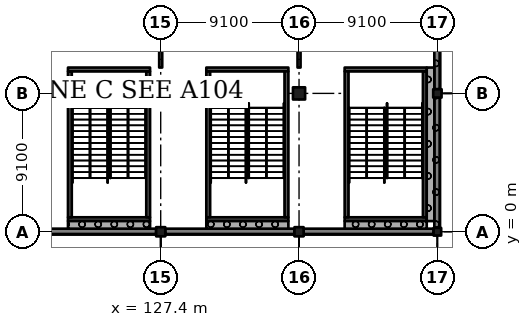
"""IFC4 building model, lengths in metres.
Left out: names, types, materials, properties, quantities, classifications, styles, units other than length and angle.
Written with IfcOpenShell. Run it as: python <this file> out.ifc"""

import sys

from ifc_helpers import new_model, si_unit, direction, frame, frame_2d, origin, origin_2d, place, context, subcontext, project, spatial, rectangle, extrude, element, fill, save


model = new_model("IFC4")
c1 = context("Model", 3, precision=1e-05, world=origin(), true_north=direction((0.0, 1.0)))
c2 = subcontext(c1, "Body", "Model", "MODEL_VIEW")
j1 = project(units=[si_unit("LENGTHUNIT", "METRE"), si_unit("PLANEANGLEUNIT", "RADIAN")], contexts=[c1])
p1 = place(None, origin())
s1 = spatial("IfcSite", under=j1, at=p1, CompositionType="ELEMENT")
p2 = place(p1, origin())
s2 = spatial("IfcBuilding", under=s1, at=p2, CompositionType="ELEMENT")
p3 = place(p2, origin())
s3 = spatial("IfcBuildingStorey", under=s2, at=p3, CompositionType="ELEMENT", Elevation=0.0)
p4 = place(p3, frame((127.4, 0.0, -0.4), z_axis=(0.0, 0.0, 1.0), x_axis=(1.0, 0.0, 0.0)))
e1 = element("IfcColumn", 1, at=p4, inside=s3, PredefinedType="COLUMN", context=c2, shape_type="SweptSolid", body=[
    extrude(rectangle(XDim=0.6, YDim=0.6, at=origin_2d()), origin(), (0.0, 0.0, 1.0), 6.77),
])
p5 = place(p3, frame((127.4, 9.1, -0.4), z_axis=(0.0, 0.0, 1.0), x_axis=(1.0, 0.0, 0.0)))
e2 = element("IfcColumn", 2, at=p5, inside=s3, PredefinedType="COLUMN", context=c2, shape_type="SweptSolid", body=[
    extrude(rectangle(XDim=0.8, YDim=0.8, at=origin_2d()), origin(), (0.0, 0.0, 1.0), 6.77),
])
p6 = place(p3, frame((136.5, 0.0, -0.4), z_axis=(0.0, 0.0, 1.0), x_axis=(1.0, 0.0, 0.0)))
e3 = element("IfcColumn", 3, at=p6, inside=s3, PredefinedType="COLUMN", context=c2, shape_type="SweptSolid", body=[
    extrude(rectangle(XDim=0.6, YDim=0.6, at=origin_2d()), origin(), (0.0, 0.0, 1.0), 6.77),
])
p7 = place(p3, frame((136.5, 9.1, -0.4), z_axis=(0.0, 0.0, 1.0), x_axis=(1.0, 0.0, 0.0)))
e4 = element("IfcColumn", 4, at=p7, inside=s3, PredefinedType="COLUMN", context=c2, shape_type="SweptSolid", body=[
    extrude(rectangle(XDim=0.8, YDim=0.8, at=origin_2d()), origin(), (0.0, 0.0, 1.0), 6.77),
])
p8 = place(p3, frame((145.6, 0.0, -0.4), z_axis=(0.0, 0.0, 1.0), x_axis=(1.0, 0.0, 0.0)))
e5 = element("IfcColumn", 5, at=p8, inside=s3, PredefinedType="COLUMN", context=c2, shape_type="SweptSolid", body=[
    extrude(rectangle(XDim=0.5, YDim=0.5, at=origin_2d()), origin(), (0.0, 0.0, 1.0), 6.77),
])
p9 = place(p3, frame((145.6, 9.1, -0.4), z_axis=(0.0, 0.0, 1.0), x_axis=(1.0, 0.0, 0.0)))
e6 = element("IfcColumn", 6, at=p9, inside=s3, PredefinedType="COLUMN", context=c2, shape_type="SweptSolid", body=[
    extrude(rectangle(XDim=0.55, YDim=0.55, at=origin_2d()), origin(), (0.0, 0.0, 1.0), 6.77),
])
p10 = place(p3, frame((144.9, 0.825, -0.4), z_axis=(0.0, 0.0, 1.0), x_axis=(-1.0, 0.0, 0.0)))
e7 = element("IfcWall", 7, at=p10, inside=s3, PredefinedType="SHEAR", context=c2, shape_type="SweptSolid", body=[
    extrude(rectangle(XDim=5.4, YDim=0.25, at=frame_2d((2.7, 0.0))), origin(), (0.0, 0.0, 1.0), 6.77),
])
p11 = place(p3, frame((144.9, 10.675, -0.4), z_axis=(0.0, 0.0, 1.0), x_axis=(-1.0, 0.0, 0.0)))
e8 = element("IfcWall", 8, at=p11, inside=s3, PredefinedType="SHEAR", context=c2, shape_type="SweptSolid", body=[
    extrude(rectangle(XDim=5.4, YDim=0.25, at=frame_2d((2.7, 0.0))), origin(), (0.0, 0.0, 1.0), 6.77),
])
p12 = place(p11, frame((1.5, 0.0, 0.4)))
e9 = element("IfcOpeningElement", 9, at=p12, cuts=e8, PredefinedType="OPENING", context=c2, shape_type="SweptSolid", body=[
    extrude(rectangle(XDim=2.4, YDim=2.1, at=frame_2d((1.2, 1.05))), frame((0.0, 0.135, 0.0), z_axis=(0.0, -1.0, 0.0), x_axis=(1.0, 0.0, 0.0)), (0.0, 0.0, 1.0), 0.27),
])
p13 = place(p3, frame((139.625, 10.55, -0.4), z_axis=(0.0, 0.0, 1.0), x_axis=(0.0, -1.0, 0.0)))
e10 = element("IfcWall", 10, at=p13, inside=s3, PredefinedType="SHEAR", context=c2, shape_type="SweptSolid", body=[
    extrude(rectangle(XDim=9.6, YDim=0.25, at=frame_2d((4.8, 0.0))), origin(), (0.0, 0.0, 1.0), 6.77),
])
p14 = place(p13, frame((0.45, 0.0, 0.4)))
e11 = element("IfcOpeningElement", 11, at=p14, cuts=e10, PredefinedType="OPENING", context=c2, shape_type="SweptSolid", body=[
    extrude(rectangle(XDim=1.2, YDim=2.1, at=frame_2d((0.6, 1.05))), frame((0.0, 0.135, 0.0), z_axis=(0.0, -1.0, 0.0), x_axis=(1.0, 0.0, 0.0)), (0.0, 0.0, 1.0), 0.27),
])
p15 = place(p3, frame((144.775, 10.55, -0.4), z_axis=(0.0, 0.0, 1.0), x_axis=(0.0, -1.0, 0.0)))
e12 = element("IfcWall", 12, at=p15, inside=s3, PredefinedType="SHEAR", context=c2, shape_type="SweptSolid", body=[
    extrude(rectangle(XDim=9.6, YDim=0.25, at=frame_2d((4.8, 0.0))), origin(), (0.0, 0.0, 1.0), 6.77),
])
p16 = place(p3, frame((135.8, 0.825, -0.4), z_axis=(0.0, 0.0, 1.0), x_axis=(-1.0, 0.0, 0.0)))
e13 = element("IfcWall", 13, at=p16, inside=s3, PredefinedType="SHEAR", context=c2, shape_type="SweptSolid", body=[
    extrude(rectangle(XDim=5.4, YDim=0.25, at=frame_2d((2.7, 0.0))), origin(), (0.0, 0.0, 1.0), 6.77),
])
p17 = place(p3, frame((135.8, 10.675, -0.4), z_axis=(0.0, 0.0, 1.0), x_axis=(-1.0, 0.0, 0.0)))
e14 = element("IfcWall", 14, at=p17, inside=s3, PredefinedType="SHEAR", context=c2, shape_type="SweptSolid", body=[
    extrude(rectangle(XDim=5.4, YDim=0.25, at=frame_2d((2.7, 0.0))), origin(), (0.0, 0.0, 1.0), 6.77),
])
p18 = place(p17, frame((1.5, 0.0, 0.4)))
e15 = element("IfcOpeningElement", 15, at=p18, cuts=e14, PredefinedType="OPENING", context=c2, shape_type="SweptSolid", body=[
    extrude(rectangle(XDim=2.4, YDim=2.1, at=frame_2d((1.2, 1.05))), frame((0.0, 0.135, 0.0), z_axis=(0.0, -1.0, 0.0), x_axis=(1.0, 0.0, 0.0)), (0.0, 0.0, 1.0), 0.27),
])
p19 = place(p3, frame((130.525, 10.55, -0.4), z_axis=(0.0, 0.0, 1.0), x_axis=(0.0, -1.0, 0.0)))
e16 = element("IfcWall", 16, at=p19, inside=s3, PredefinedType="SHEAR", context=c2, shape_type="SweptSolid", body=[
    extrude(rectangle(XDim=9.6, YDim=0.25, at=frame_2d((4.8, 0.0))), origin(), (0.0, 0.0, 1.0), 6.77),
])
p20 = place(p19, frame((0.45, 0.0, 0.4)))
e17 = element("IfcOpeningElement", 17, at=p20, cuts=e16, PredefinedType="OPENING", context=c2, shape_type="SweptSolid", body=[
    extrude(rectangle(XDim=1.2, YDim=2.1, at=frame_2d((0.6, 1.05))), frame((0.0, 0.135, 0.0), z_axis=(0.0, -1.0, 0.0), x_axis=(1.0, 0.0, 0.0)), (0.0, 0.0, 1.0), 0.27),
])
p21 = place(p3, frame((135.675, 10.55, -0.4), z_axis=(0.0, 0.0, 1.0), x_axis=(0.0, -1.0, 0.0)))
e18 = element("IfcWall", 18, at=p21, inside=s3, PredefinedType="SHEAR", context=c2, shape_type="SweptSolid", body=[
    extrude(rectangle(XDim=9.6, YDim=0.25, at=frame_2d((4.8, 0.0))), origin(), (0.0, 0.0, 1.0), 6.77),
])
p22 = place(p3, frame((126.7, 0.825, -0.4), z_axis=(0.0, 0.0, 1.0), x_axis=(-1.0, 0.0, 0.0)))
e19 = element("IfcWall", 19, at=p22, inside=s3, PredefinedType="SHEAR", context=c2, shape_type="SweptSolid", body=[
    extrude(rectangle(XDim=5.4, YDim=0.25, at=frame_2d((2.7, 0.0))), origin(), (0.0, 0.0, 1.0), 6.77),
])
p23 = place(p3, frame((126.7, 10.675, -0.4), z_axis=(0.0, 0.0, 1.0), x_axis=(-1.0, 0.0, 0.0)))
e20 = element("IfcWall", 20, at=p23, inside=s3, PredefinedType="SHEAR", context=c2, shape_type="SweptSolid", body=[
    extrude(rectangle(XDim=5.4, YDim=0.25, at=frame_2d((2.7, 0.0))), origin(), (0.0, 0.0, 1.0), 6.77),
])
p24 = place(p23, frame((1.5, 0.0, 0.4)))
e21 = element("IfcOpeningElement", 21, at=p24, cuts=e20, PredefinedType="OPENING", context=c2, shape_type="SweptSolid", body=[
    extrude(rectangle(XDim=2.4, YDim=2.1, at=frame_2d((1.2, 1.05))), frame((0.0, 0.135, 0.0), z_axis=(0.0, -1.0, 0.0), x_axis=(1.0, 0.0, 0.0)), (0.0, 0.0, 1.0), 0.27),
])
p25 = place(p3, frame((121.425, 10.55, -0.4), z_axis=(0.0, 0.0, 1.0), x_axis=(0.0, -1.0, 0.0)))
e22 = element("IfcWall", 22, at=p25, inside=s3, PredefinedType="SHEAR", context=c2, shape_type="SweptSolid", body=[
    extrude(rectangle(XDim=9.6, YDim=0.25, at=frame_2d((4.8, 0.0))), origin(), (0.0, 0.0, 1.0), 6.77),
])
p26 = place(p25, frame((0.45, 0.0, 0.4)))
e23 = element("IfcOpeningElement", 23, at=p26, cuts=e22, PredefinedType="OPENING", context=c2, shape_type="SweptSolid", body=[
    extrude(rectangle(XDim=1.2, YDim=2.1, at=frame_2d((0.6, 1.05))), frame((0.0, 0.135, 0.0), z_axis=(0.0, -1.0, 0.0), x_axis=(1.0, 0.0, 0.0)), (0.0, 0.0, 1.0), 0.27),
])
p27 = place(p3, frame((126.575, 10.55, -0.4), z_axis=(0.0, 0.0, 1.0), x_axis=(0.0, -1.0, 0.0)))
e24 = element("IfcWall", 24, at=p27, inside=s3, PredefinedType="SHEAR", context=c2, shape_type="SweptSolid", body=[
    extrude(rectangle(XDim=9.6, YDim=0.25, at=frame_2d((4.8, 0.0))), origin(), (0.0, 0.0, 1.0), 6.77),
])
p28 = place(p3, frame((118.6, 0.025, 0.0), z_axis=(0.0, 0.0, 1.0), x_axis=(1.0, 0.0, 0.0)))
e25 = element("IfcWall", 25, at=p28, inside=s3, PredefinedType="SOLIDWALL", context=c2, shape_type="SweptSolid", body=[
    extrude(rectangle(XDim=8.5, YDim=0.35, at=frame_2d((4.25, 0.0))), origin(), (0.0, 0.0, 1.0), 5.27),
])
p29 = place(p28, frame((0.45, 0.0, 0.0)))
e26 = element("IfcOpeningElement", 26, at=p29, cuts=e25, PredefinedType="OPENING", context=c2, shape_type="SweptSolid", body=[
    extrude(rectangle(XDim=2.1, YDim=2.4, at=frame_2d((1.05, 1.2))), frame((0.0, 0.185, 0.0), z_axis=(0.0, -1.0, 0.0), x_axis=(1.0, 0.0, 0.0)), (0.0, 0.0, 1.0), 0.37),
])
p30 = place(p3, frame((127.7, 0.025, 0.0), z_axis=(0.0, 0.0, 1.0), x_axis=(1.0, 0.0, 0.0)))
e27 = element("IfcWall", 27, at=p30, inside=s3, PredefinedType="SOLIDWALL", context=c2, shape_type="SweptSolid", body=[
    extrude(rectangle(XDim=8.5, YDim=0.35, at=frame_2d((4.25, 0.0))), origin(), (0.0, 0.0, 1.0), 5.27),
])
p31 = place(p30, frame((0.45, 0.0, 0.0)))
e28 = element("IfcOpeningElement", 28, at=p31, cuts=e27, PredefinedType="OPENING", context=c2, shape_type="SweptSolid", body=[
    extrude(rectangle(XDim=2.1, YDim=2.4, at=frame_2d((1.05, 1.2))), frame((0.0, 0.185, 0.0), z_axis=(0.0, -1.0, 0.0), x_axis=(1.0, 0.0, 0.0)), (0.0, 0.0, 1.0), 0.37),
])
p32 = place(p3, frame((136.8, 0.025, 0.0), z_axis=(0.0, 0.0, 1.0), x_axis=(1.0, 0.0, 0.0)))
e29 = element("IfcWall", 29, at=p32, inside=s3, PredefinedType="SOLIDWALL", context=c2, shape_type="SweptSolid", body=[
    extrude(rectangle(XDim=8.55, YDim=0.35, at=frame_2d((4.275, 0.0))), origin(), (0.0, 0.0, 1.0), 5.27),
])
p33 = place(p32, frame((0.6, 0.0, 0.0)))
e30 = element("IfcOpeningElement", 30, at=p33, cuts=e29, PredefinedType="OPENING", context=c2, shape_type="SweptSolid", body=[
    extrude(rectangle(XDim=1.8, YDim=2.4, at=frame_2d((0.9, 1.2))), frame((0.0, 0.185, 0.0), z_axis=(0.0, -1.0, 0.0), x_axis=(1.0, 0.0, 0.0)), (0.0, 0.0, 1.0), 0.37),
])
p34 = place(p3, frame((145.575, 0.25, 0.0), z_axis=(0.0, 0.0, 1.0), x_axis=(0.0, 1.0, 0.0)))
e31 = element("IfcWall", 31, at=p34, inside=s3, PredefinedType="SOLIDWALL", context=c2, shape_type="SweptSolid", body=[
    extrude(rectangle(XDim=8.575, YDim=0.35, at=frame_2d((4.288, 0.0))), origin(), (0.0, 0.0, 1.0), 5.27),
])
p35 = place(p3, frame((145.575, 9.375, 0.0), z_axis=(0.0, 0.0, 1.0), x_axis=(0.0, 1.0, 0.0)))
e32 = element("IfcWall", 32, at=p35, inside=s3, PredefinedType="SOLIDWALL", context=c2, shape_type="SweptSolid", body=[
    extrude(rectangle(XDim=8.525, YDim=0.35, at=frame_2d((4.262, 0.0))), origin(), (0.0, 0.0, 1.0), 5.27),
])
p36 = place(p35, frame((1.625, 0.0, 0.0)))
e33 = element("IfcOpeningElement", 33, at=p36, cuts=e32, PredefinedType="OPENING", context=c2, shape_type="SweptSolid", body=[
    extrude(rectangle(XDim=2.4, YDim=2.4, at=frame_2d((1.2, 1.2))), frame((0.0, 0.185, 0.0), z_axis=(0.0, -1.0, 0.0), x_axis=(1.0, 0.0, 0.0)), (0.0, 0.0, 1.0), 0.37),
])
p37 = place(p35, frame((4.625, 0.0, 0.0)))
e34 = element("IfcOpeningElement", 34, at=p37, cuts=e32, PredefinedType="OPENING", context=c2, shape_type="SweptSolid", body=[
    extrude(rectangle(XDim=2.4, YDim=2.4, at=frame_2d((1.2, 1.2))), frame((0.0, 0.185, 0.0), z_axis=(0.0, -1.0, 0.0), x_axis=(1.0, 0.0, 0.0)), (0.0, 0.0, 1.0), 0.37),
])
p38 = place(p3, frame((139.5, 0.45, 0.0), z_axis=(0.0, 0.0, 1.0), x_axis=(1.0, 0.0, 0.0)))
e35 = element("IfcWall", 35, at=p38, inside=s3, PredefinedType="SOLIDWALL", context=c2, shape_type="SweptSolid", body=[
    extrude(rectangle(XDim=5.4, YDim=0.5, at=frame_2d((2.7, 0.0))), origin(), (0.0, 0.0, 1.0), 6.37),
])
p39 = place(p3, frame((145.15, 0.7, 0.0), z_axis=(0.0, 0.0, 1.0), x_axis=(0.0, 1.0, 0.0)))
e36 = element("IfcWall", 36, at=p39, inside=s3, PredefinedType="SOLIDWALL", context=c2, shape_type="SweptSolid", body=[
    extrude(rectangle(XDim=10.1, YDim=0.5, at=frame_2d((5.05, 0.0))), origin(), (0.0, 0.0, 1.0), 6.37),
])
p40 = place(p3, frame((130.4, 0.45, 0.0), z_axis=(0.0, 0.0, 1.0), x_axis=(1.0, 0.0, 0.0)))
e37 = element("IfcWall", 37, at=p40, inside=s3, PredefinedType="SOLIDWALL", context=c2, shape_type="SweptSolid", body=[
    extrude(rectangle(XDim=5.4, YDim=0.5, at=frame_2d((2.7, 0.0))), origin(), (0.0, 0.0, 1.0), 6.37),
])
p41 = place(p3, frame((121.3, 0.45, 0.0), z_axis=(0.0, 0.0, 1.0), x_axis=(1.0, 0.0, 0.0)))
e38 = element("IfcWall", 38, at=p41, inside=s3, PredefinedType="SOLIDWALL", context=c2, shape_type="SweptSolid", body=[
    extrude(rectangle(XDim=5.4, YDim=0.5, at=frame_2d((2.7, 0.0))), origin(), (0.0, 0.0, 1.0), 6.37),
])
p42 = place(p3, frame((127.4, 10.8, 0.0), z_axis=(0.0, 0.0, 1.0), x_axis=(0.0, 1.0, 0.0)))
e39 = element("IfcWall", 39, at=p42, inside=s3, PredefinedType="PARTITIONING", context=c2, shape_type="SweptSolid", body=[
    extrude(rectangle(XDim=6.95, YDim=0.2, at=frame_2d((3.475, 0.0))), origin(), (0.0, 0.0, 1.0), 5.32),
])
p43 = place(p42, frame((0.85, 0.0, 0.0)))
e40 = element("IfcOpeningElement", 40, at=p43, cuts=e39, PredefinedType="OPENING", context=c2, shape_type="SweptSolid", body=[
    extrude(rectangle(XDim=1.8, YDim=2.4, at=frame_2d((0.9, 1.2))), frame((0.0, 0.11, 0.0), z_axis=(0.0, -1.0, 0.0), x_axis=(1.0, 0.0, 0.0)), (0.0, 0.0, 1.0), 0.22),
])
p44 = place(p42, frame((4.35, 0.0, 0.0)))
e41 = element("IfcOpeningElement", 41, at=p44, cuts=e39, PredefinedType="OPENING", context=c2, shape_type="SweptSolid", body=[
    extrude(rectangle(XDim=1.8, YDim=2.4, at=frame_2d((0.9, 1.2))), frame((0.0, 0.11, 0.0), z_axis=(0.0, -1.0, 0.0), x_axis=(1.0, 0.0, 0.0)), (0.0, 0.0, 1.0), 0.22),
])
p45 = place(p3, frame((136.5, 10.8, 0.0), z_axis=(0.0, 0.0, 1.0), x_axis=(0.0, 1.0, 0.0)))
e42 = element("IfcWall", 42, at=p45, inside=s3, PredefinedType="PARTITIONING", context=c2, shape_type="SweptSolid", body=[
    extrude(rectangle(XDim=6.975, YDim=0.2, at=frame_2d((3.487, 0.0))), origin(), (0.0, 0.0, 1.0), 5.32),
])
p46 = place(p45, frame((0.85, 0.0, 0.0)))
e43 = element("IfcOpeningElement", 43, at=p46, cuts=e42, PredefinedType="OPENING", context=c2, shape_type="SweptSolid", body=[
    extrude(rectangle(XDim=1.8, YDim=2.4, at=frame_2d((0.9, 1.2))), frame((0.0, 0.11, 0.0), z_axis=(0.0, -1.0, 0.0), x_axis=(1.0, 0.0, 0.0)), (0.0, 0.0, 1.0), 0.22),
])
p47 = place(p45, frame((4.35, 0.0, 0.0)))
e44 = element("IfcOpeningElement", 44, at=p47, cuts=e42, PredefinedType="OPENING", context=c2, shape_type="SweptSolid", body=[
    extrude(rectangle(XDim=1.8, YDim=2.4, at=frame_2d((0.9, 1.2))), frame((0.0, 0.11, 0.0), z_axis=(0.0, -1.0, 0.0), x_axis=(1.0, 0.0, 0.0)), (0.0, 0.0, 1.0), 0.22),
])
p48 = place(p29, frame((2.1, 0.0, 0.0), z_axis=(0.0, 0.0, 1.0), x_axis=(-1.0, 0.0, 0.0)))
e45 = element("IfcDoor", 45, at=p48, inside=s3, OperationType="DOUBLE_DOOR_SINGLE_SWING", PredefinedType="DOOR", context=c2, shape_type="SweptSolid", body=[
    extrude(rectangle(XDim=2.1, YDim=2.4, at=frame_2d((1.05, 1.2))), frame((0.0, 0.025, 0.0), z_axis=(0.0, -1.0, 0.0), x_axis=(1.0, 0.0, 0.0)), (0.0, 0.0, 1.0), 0.05),
])
fill(e26, e45)
p49 = place(p31, frame((2.1, 0.0, 0.0), z_axis=(0.0, 0.0, 1.0), x_axis=(-1.0, 0.0, 0.0)))
e46 = element("IfcDoor", 46, at=p49, inside=s3, OperationType="DOUBLE_DOOR_SINGLE_SWING", PredefinedType="DOOR", context=c2, shape_type="SweptSolid", body=[
    extrude(rectangle(XDim=2.1, YDim=2.4, at=frame_2d((1.05, 1.2))), frame((0.0, 0.025, 0.0), z_axis=(0.0, -1.0, 0.0), x_axis=(1.0, 0.0, 0.0)), (0.0, 0.0, 1.0), 0.05),
])
fill(e28, e46)
p50 = place(p33, frame((1.8, 0.0, 0.0), z_axis=(0.0, 0.0, 1.0), x_axis=(-1.0, 0.0, 0.0)))
e47 = element("IfcDoor", 47, at=p50, inside=s3, OperationType="DOUBLE_DOOR_SINGLE_SWING", PredefinedType="DOOR", context=c2, shape_type="SweptSolid", body=[
    extrude(rectangle(XDim=1.8, YDim=2.4, at=frame_2d((0.9, 1.2))), frame((0.0, 0.025, 0.0), z_axis=(0.0, -1.0, 0.0), x_axis=(1.0, 0.0, 0.0)), (0.0, 0.0, 1.0), 0.05),
])
fill(e30, e47)
p51 = place(p36, frame((2.4, 0.0, 0.0), z_axis=(0.0, 0.0, 1.0), x_axis=(-1.0, 0.0, 0.0)))
e48 = element("IfcDoor", 48, at=p51, inside=s3, OperationType="DOUBLE_DOOR_SINGLE_SWING", PredefinedType="DOOR", context=c2, shape_type="SweptSolid", body=[
    extrude(rectangle(XDim=2.4, YDim=2.4, at=frame_2d((1.2, 1.2))), frame((0.0, 0.025, 0.0), z_axis=(0.0, -1.0, 0.0), x_axis=(1.0, 0.0, 0.0)), (0.0, 0.0, 1.0), 0.05),
])
fill(e33, e48)
p52 = place(p46, origin())
e49 = element("IfcDoor", 49, at=p52, inside=s3, OperationType="DOUBLE_DOOR_SINGLE_SWING", PredefinedType="DOOR", context=c2, shape_type="SweptSolid", body=[
    extrude(rectangle(XDim=1.8, YDim=2.4, at=frame_2d((0.9, 1.2))), frame((0.0, 0.025, 0.0), z_axis=(0.0, -1.0, 0.0), x_axis=(1.0, 0.0, 0.0)), (0.0, 0.0, 1.0), 0.05),
])
fill(e43, e49)
p53 = place(p43, origin())
e50 = element("IfcDoor", 50, at=p53, inside=s3, OperationType="DOUBLE_DOOR_SINGLE_SWING", PredefinedType="DOOR", context=c2, shape_type="SweptSolid", body=[
    extrude(rectangle(XDim=1.8, YDim=2.4, at=frame_2d((0.9, 1.2))), frame((0.0, 0.025, 0.0), z_axis=(0.0, -1.0, 0.0), x_axis=(1.0, 0.0, 0.0)), (0.0, 0.0, 1.0), 0.05),
])
fill(e40, e50)
p54 = place(p12, origin())
e51 = element("IfcDoor", 51, at=p54, inside=s3, OperationType="DOUBLE_DOOR_SINGLE_SWING", PredefinedType="DOOR", context=c2, shape_type="SweptSolid", body=[
    extrude(rectangle(XDim=2.4, YDim=2.1, at=frame_2d((1.2, 1.05))), frame((0.0, 0.025, 0.0), z_axis=(0.0, -1.0, 0.0), x_axis=(1.0, 0.0, 0.0)), (0.0, 0.0, 1.0), 0.05),
])
fill(e9, e51)
p55 = place(p18, origin())
e52 = element("IfcDoor", 52, at=p55, inside=s3, OperationType="DOUBLE_DOOR_SINGLE_SWING", PredefinedType="DOOR", context=c2, shape_type="SweptSolid", body=[
    extrude(rectangle(XDim=2.4, YDim=2.1, at=frame_2d((1.2, 1.05))), frame((0.0, 0.025, 0.0), z_axis=(0.0, -1.0, 0.0), x_axis=(1.0, 0.0, 0.0)), (0.0, 0.0, 1.0), 0.05),
])
fill(e15, e52)
p56 = place(p24, origin())
e53 = element("IfcDoor", 53, at=p56, inside=s3, OperationType="DOUBLE_DOOR_SINGLE_SWING", PredefinedType="DOOR", context=c2, shape_type="SweptSolid", body=[
    extrude(rectangle(XDim=2.4, YDim=2.1, at=frame_2d((1.2, 1.05))), frame((0.0, 0.025, 0.0), z_axis=(0.0, -1.0, 0.0), x_axis=(1.0, 0.0, 0.0)), (0.0, 0.0, 1.0), 0.05),
])
fill(e21, e53)
p57 = place(p14, origin())
e54 = element("IfcDoor", 54, at=p57, inside=s3, OperationType="SINGLE_SWING_LEFT", PredefinedType="DOOR", context=c2, shape_type="SweptSolid", body=[
    extrude(rectangle(XDim=1.2, YDim=2.1, at=frame_2d((0.6, 1.05))), frame((0.0, 0.025, 0.0), z_axis=(0.0, -1.0, 0.0), x_axis=(1.0, 0.0, 0.0)), (0.0, 0.0, 1.0), 0.05),
])
fill(e11, e54)
p58 = place(p20, origin())
e55 = element("IfcDoor", 55, at=p58, inside=s3, OperationType="SINGLE_SWING_LEFT", PredefinedType="DOOR", context=c2, shape_type="SweptSolid", body=[
    extrude(rectangle(XDim=1.2, YDim=2.1, at=frame_2d((0.6, 1.05))), frame((0.0, 0.025, 0.0), z_axis=(0.0, -1.0, 0.0), x_axis=(1.0, 0.0, 0.0)), (0.0, 0.0, 1.0), 0.05),
])
fill(e17, e55)
p59 = place(p26, origin())
e56 = element("IfcDoor", 56, at=p59, inside=s3, OperationType="SINGLE_SWING_LEFT", PredefinedType="DOOR", context=c2, shape_type="SweptSolid", body=[
    extrude(rectangle(XDim=1.2, YDim=2.1, at=frame_2d((0.6, 1.05))), frame((0.0, 0.025, 0.0), z_axis=(0.0, -1.0, 0.0), x_axis=(1.0, 0.0, 0.0)), (0.0, 0.0, 1.0), 0.05),
])
fill(e23, e56)
save(model, sys.argv[1])
